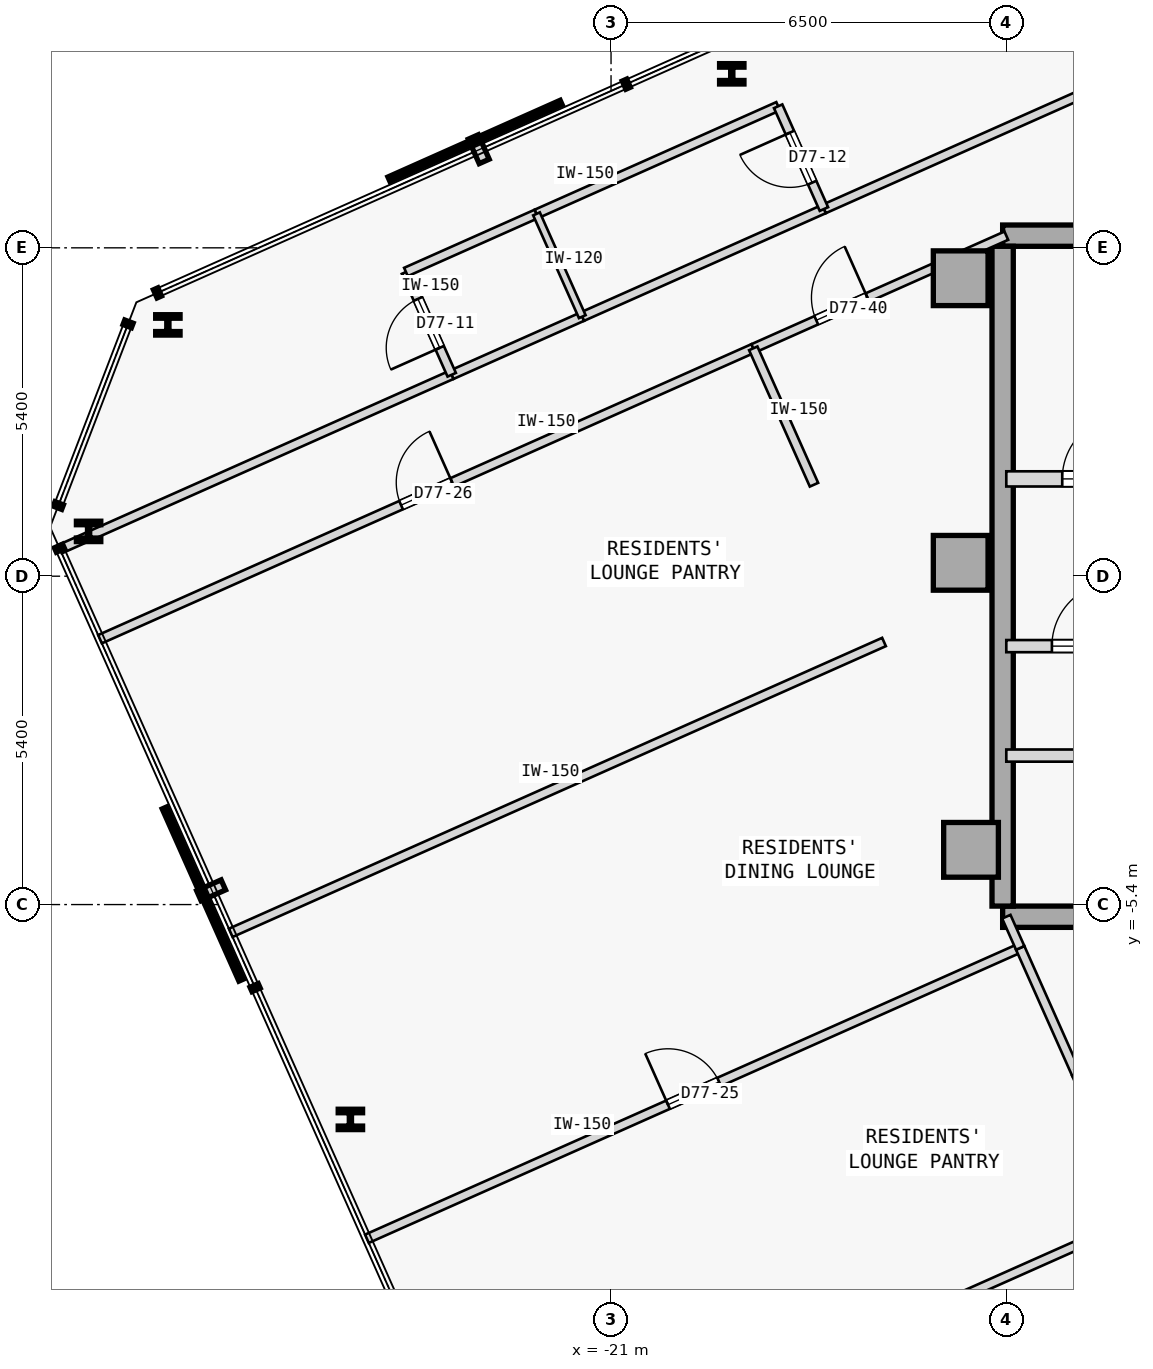
"""IFC4 building model, lengths in metres.
Left out: names, types, materials, properties, quantities, classifications, styles, units other than length and angle.
Written with IfcOpenShell. Run it as: python <this file> out.ifc"""

import sys

from ifc_helpers import new_model, si_unit, direction, frame, frame_2d, origin, origin_2d, place, context, subcontext, project, spatial, rectangle, i_section, extrude, element, fill, save


model = new_model("IFC4")
c1 = context("Model", 3, precision=1e-05, world=origin(), true_north=direction((0.0, 1.0)))
c2 = subcontext(c1, "Body", "Model", "MODEL_VIEW")
j1 = project(units=[si_unit("LENGTHUNIT", "METRE"), si_unit("PLANEANGLEUNIT", "RADIAN")], contexts=[c1])
p1 = place(None, origin())
s1 = spatial("IfcSite", under=j1, at=p1, CompositionType="ELEMENT")
p2 = place(p1, origin())
s2 = spatial("IfcBuilding", under=s1, at=p2, CompositionType="ELEMENT")
p3 = place(p2, frame((0.0, 0.0, 288.6)))
s3 = spatial("IfcBuildingStorey", under=s2, at=p3, CompositionType="ELEMENT", Elevation=288.6)
for number, where, z_axis, x_axis in (
    (1, (-15.25, 4.9, 0.0), (0.0, 0.0, 1.0), (1.0, 0.0, 0.0)),
    (2, (-15.25, 0.22, 0.0), (0.0, 0.0, 1.0), (1.0, 0.0, 0.0)),
    (3, (-15.08, -4.5, 0.0), (0.0, 0.0, 1.0), (1.0, 0.0, 0.0)),
):
    element("IfcColumn", number, at=place(p3, frame(where, z_axis=z_axis, x_axis=x_axis)), inside=s3, PredefinedType="COLUMN", context=c2, shape_type="SweptSolid", body=[
        extrude(rectangle(XDim=0.9, YDim=0.9, at=origin_2d()), origin(), (0.0, 0.0, 1.0), 3.35),
    ])
p4 = place(p3, frame((-14.56, 5.6, 0.0), z_axis=(0.0, 0.0, 1.0), x_axis=(1.0, 0.0, 0.0)))
e4 = element("IfcWall", 4, at=p4, inside=s3, PredefinedType="SHEAR", context=c2, shape_type="SweptSolid", body=[
    extrude(rectangle(XDim=11.41, YDim=0.35, at=frame_2d((5.705, 0.0))), origin(), (0.0, 0.0, 1.0), 3.125),
])
p5 = place(p3, frame((-14.56, -5.6, 0.0), z_axis=(0.0, 0.0, 1.0), x_axis=(1.0, 0.0, 0.0)))
e5 = element("IfcWall", 5, at=p5, inside=s3, PredefinedType="SHEAR", context=c2, shape_type="SweptSolid", body=[
    extrude(rectangle(XDim=10.86, YDim=0.35, at=frame_2d((5.43, 0.0))), origin(), (0.0, 0.0, 1.0), 3.125),
])
p6 = place(p3, frame((-14.56, -5.425, 0.0), z_axis=(0.0, 0.0, 1.0), x_axis=(0.0, 1.0, 0.0)))
e6 = element("IfcWall", 6, at=p6, inside=s3, PredefinedType="SHEAR", context=c2, shape_type="SweptSolid", body=[
    extrude(rectangle(XDim=10.85, YDim=0.35, at=frame_2d((5.425, 0.0))), origin(), (0.0, 0.0, 1.0), 3.125),
])
for number, where, z_axis, x_axis in (
    (7, (-19.015, 8.262, 0.0), (0.0, 0.0, 1.0), (1.0, 0.0, 0.0)),
    (8, (-28.288, 4.133, 0.0), (0.0, 0.0, 1.0), (1.0, 0.0, 0.0)),
    (9, (-29.592, 0.737, 0.0), (0.0, 0.0, 1.0), (1.0, 0.0, 0.0)),
    (10, (-25.286, -8.933, 0.0), (0.0, 0.0, 1.0), (1.0, 0.0, 0.0)),
):
    element("IfcColumn", number, at=place(p3, frame(where, z_axis=z_axis, x_axis=x_axis)), inside=s3, PredefinedType="COLUMN", context=c2, shape_type="SweptSolid", body=[
        extrude(i_section(OverallWidth=0.401, OverallDepth=0.335, WebThickness=0.036, FlangeThickness=0.058, FilletRadius=0.015, at=origin_2d()), origin(), (0.0, 0.0, 1.0), 3.35),
    ])
p7 = place(p3, frame((-14.5, 1.6, 0.0), z_axis=(0.0, 0.0, 1.0), x_axis=(1.0, 0.0, 0.0)))
e11 = element("IfcWall", 11, at=p7, inside=s3, PredefinedType="STANDARD", context=c2, shape_type="SweptSolid", body=[
    extrude(rectangle(XDim=3.6, YDim=0.25, at=frame_2d((1.8, 0.0))), origin(), (0.0, 0.0, 1.0), 3.125),
])
p8 = place(p7, frame((0.92, 0.0, 0.0)))
e12 = element("IfcOpeningElement", 12, at=p8, cuts=e11, PredefinedType="OPENING", context=c2, shape_type="SweptSolid", body=[
    extrude(rectangle(XDim=1.05, YDim=2.15, at=frame_2d((0.525, 1.075))), frame((0.0, 0.135, 0.0), z_axis=(0.0, -1.0, 0.0), x_axis=(1.0, 0.0, 0.0)), (0.0, 0.0, 1.0), 0.27),
])
p9 = place(p3, frame((-14.5, -1.15, 0.0), z_axis=(0.0, 0.0, 1.0), x_axis=(1.0, 0.0, 0.0)))
e13 = element("IfcWall", 13, at=p9, inside=s3, PredefinedType="STANDARD", context=c2, shape_type="SweptSolid", body=[
    extrude(rectangle(XDim=2.95, YDim=0.2, at=frame_2d((1.475, 0.0))), origin(), (0.0, 0.0, 1.0), 3.125),
])
p10 = place(p9, frame((0.75, 0.0, 0.0)))
e14 = element("IfcOpeningElement", 14, at=p10, cuts=e13, PredefinedType="OPENING", context=c2, shape_type="SweptSolid", body=[
    extrude(rectangle(XDim=1.05, YDim=2.18, at=frame_2d((0.525, 1.09))), frame((0.0, 0.11, 0.0), z_axis=(0.0, -1.0, 0.0), x_axis=(1.0, 0.0, 0.0)), (0.0, 0.0, 1.0), 0.22),
])
p11 = place(p3, frame((-14.5, -2.95, 0.0), z_axis=(0.0, 0.0, 1.0), x_axis=(1.0, 0.0, 0.0)))
e15 = element("IfcWall", 15, at=p11, inside=s3, PredefinedType="STANDARD", context=c2, shape_type="SweptSolid", body=[
    extrude(rectangle(XDim=10.8, YDim=0.2, at=frame_2d((5.4, 0.0))), origin(), (0.0, 0.0, 1.0), 3.125),
])
p12 = place(p11, frame((9.17, 0.0, 0.0)))
e16 = element("IfcOpeningElement", 16, at=p12, cuts=e15, PredefinedType="OPENING", context=c2, shape_type="SweptSolid", body=[
    extrude(rectangle(XDim=1.1, YDim=2.15, at=frame_2d((0.55, 1.075))), frame((0.0, 0.11, 0.0), z_axis=(0.0, -1.0, 0.0), x_axis=(1.0, 0.0, 0.0)), (0.0, 0.0, 1.0), 0.22),
])
p13 = place(p11, frame((3.86, 0.0, 0.0)))
e17 = element("IfcOpeningElement", 17, at=p13, cuts=e15, PredefinedType="OPENING", context=c2, shape_type="SweptSolid", body=[
    extrude(rectangle(XDim=0.92, YDim=2.15, at=frame_2d((0.46, 1.075))), frame((0.0, 0.11, 0.0), z_axis=(0.0, -1.0, 0.0), x_axis=(1.0, 0.0, 0.0)), (0.0, 0.0, 1.0), 0.22),
])
p14 = place(p3, frame((-30.063, 0.444, 0.0), z_axis=(0.0, 0.0, 1.0), x_axis=(0.91354584652, 0.406735769642, 0.0)))
e18 = element("IfcWall", 18, at=p14, inside=s3, PredefinedType="PARTITIONING", context=c2, shape_type="SweptSolid", body=[
    extrude(rectangle(XDim=7.053, YDim=0.15, at=frame_2d((3.526, 0.0))), origin(), (0.0, 0.0, 1.0), 3.125),
])
p15 = place(p3, frame((-17.499, 6.038, 0.0), z_axis=(0.0, 0.0, 1.0), x_axis=(0.913541623157, 0.406745255362, 0.0)))
e19 = element("IfcWall", 19, at=p15, inside=s3, PredefinedType="PARTITIONING", context=c2, shape_type="SweptSolid", body=[
    extrude(rectangle(XDim=17.879, YDim=0.15, at=frame_2d((8.939, 0.0))), origin(), (0.0, 0.0, 1.0), 3.125),
])
p16 = place(p15, frame((8.465, 0.0, 0.0)))
e20 = element("IfcOpeningElement", 20, at=p16, cuts=e19, PredefinedType="OPENING", context=c2, shape_type="SweptSolid", body=[
    extrude(rectangle(XDim=0.95, YDim=2.15, at=frame_2d((0.475, 1.075))), frame((0.0, 0.085, 0.0), z_axis=(0.0, -1.0, 0.0), x_axis=(1.0, 0.0, 0.0)), (0.0, 0.0, 1.0), 0.17),
])
p17 = place(p3, frame((-23.62, 3.312, 0.0), z_axis=(0.0, 0.0, 1.0), x_axis=(0.913558622212, 0.406707073682, 0.0)))
e21 = element("IfcWall", 21, at=p17, inside=s3, PredefinedType="PARTITIONING", context=c2, shape_type="SweptSolid", body=[
    extrude(rectangle(XDim=2.35, YDim=0.15, at=frame_2d((1.175, 0.0))), origin(), (0.0, 0.0, 1.0), 3.125),
])
p18 = place(p3, frame((-21.473, 4.268, 0.0), z_axis=(0.0, 0.0, 1.0), x_axis=(0.913545193015, 0.406737237438, 0.0)))
e22 = element("IfcWall", 22, at=p18, inside=s3, PredefinedType="PARTITIONING", context=c2, shape_type="SweptSolid", body=[
    extrude(rectangle(XDim=4.35, YDim=0.15, at=frame_2d((2.175, 0.0))), origin(), (0.0, 0.0, 1.0), 3.125),
])
p19 = place(p3, frame((-29.404, -1.036, 0.0), z_axis=(0.0, 0.0, 1.0), x_axis=(0.913544247064, 0.406739362069, 0.0)))
e23 = element("IfcWall", 23, at=p19, inside=s3, PredefinedType="PARTITIONING", context=c2, shape_type="SweptSolid", body=[
    extrude(rectangle(XDim=11.76, YDim=0.15, at=frame_2d((5.88, 0.0))), origin(), (0.0, 0.0, 1.0), 3.125),
])
p20 = place(p19, frame((5.42, 0.0, 0.0)))
e24 = element("IfcOpeningElement", 24, at=p20, cuts=e23, PredefinedType="OPENING", context=c2, shape_type="SweptSolid", body=[
    extrude(rectangle(XDim=0.92, YDim=2.15, at=frame_2d((0.46, 1.075))), frame((0.0, 0.085, 0.0), z_axis=(0.0, -1.0, 0.0), x_axis=(1.0, 0.0, 0.0)), (0.0, 0.0, 1.0), 0.17),
])
p21 = place(p3, frame((-18.661, 3.747, 0.0), z_axis=(0.0, 0.0, 1.0), x_axis=(0.913535055583, 0.40676000568, 0.0)))
e25 = element("IfcWall", 25, at=p21, inside=s3, PredefinedType="PARTITIONING", context=c2, shape_type="SweptSolid", body=[
    extrude(rectangle(XDim=4.555, YDim=0.15, at=frame_2d((2.277, 0.0))), origin(), (0.0, 0.0, 1.0), 3.125),
])
p22 = place(p21, frame((1.134, 0.0, 0.0)))
e26 = element("IfcOpeningElement", 26, at=p22, cuts=e25, PredefinedType="OPENING", context=c2, shape_type="SweptSolid", body=[
    extrude(rectangle(XDim=0.92, YDim=2.15, at=frame_2d((0.46, 1.075))), frame((0.0, 0.085, 0.0), z_axis=(0.0, -1.0, 0.0), x_axis=(1.0, 0.0, 0.0)), (0.0, 0.0, 1.0), 0.17),
])
p23 = place(p3, frame((-23.62, 3.312, 0.0), z_axis=(0.0, 0.0, 1.0), x_axis=(-0.406701600856, 0.913561058639, 0.0)))
e27 = element("IfcWall", 27, at=p23, inside=s3, PredefinedType="PARTITIONING", context=c2, shape_type="SweptSolid", body=[
    extrude(rectangle(XDim=1.85, YDim=0.15, at=frame_2d((0.925, 0.0))), origin(), (0.0, 0.0, 1.0), 3.125),
])
p24 = place(p23, frame((0.485, 0.0, 0.0)))
e28 = element("IfcOpeningElement", 28, at=p24, cuts=e27, PredefinedType="OPENING", context=c2, shape_type="SweptSolid", body=[
    extrude(rectangle(XDim=0.88, YDim=2.15, at=frame_2d((0.44, 1.075))), frame((0.0, 0.085, 0.0), z_axis=(0.0, -1.0, 0.0), x_axis=(1.0, 0.0, 0.0)), (0.0, 0.0, 1.0), 0.17),
])
p25 = place(p3, frame((-24.373, 5.003, 0.0), z_axis=(0.0, 0.0, 1.0), x_axis=(0.913558622212, 0.406707073682, 0.0)))
e29 = element("IfcWall", 29, at=p25, inside=s3, PredefinedType="PARTITIONING", context=c2, shape_type="SweptSolid", body=[
    extrude(rectangle(XDim=2.35, YDim=0.15, at=frame_2d((1.175, 0.0))), origin(), (0.0, 0.0, 1.0), 3.125),
])
p26 = place(p3, frame((-22.226, 5.958, 0.0), z_axis=(0.0, 0.0, 1.0), x_axis=(0.913545193015, 0.406737237438, 0.0)))
e30 = element("IfcWall", 30, at=p26, inside=s3, PredefinedType="PARTITIONING", context=c2, shape_type="SweptSolid", body=[
    extrude(rectangle(XDim=4.35, YDim=0.15, at=frame_2d((2.175, 0.0))), origin(), (0.0, 0.0, 1.0), 3.125),
])
p27 = place(p3, frame((-17.499, 6.038, 0.0), z_axis=(0.0, 0.0, 1.0), x_axis=(-0.406701600856, 0.913561058639, 0.0)))
e31 = element("IfcWall", 31, at=p27, inside=s3, PredefinedType="PARTITIONING", context=c2, shape_type="SweptSolid", body=[
    extrude(rectangle(XDim=1.85, YDim=0.15, at=frame_2d((0.925, 0.0))), origin(), (0.0, 0.0, 1.0), 3.125),
])
p28 = place(p27, frame((0.475, 0.0, 0.0)))
e32 = element("IfcOpeningElement", 32, at=p28, cuts=e31, PredefinedType="OPENING", context=c2, shape_type="SweptSolid", body=[
    extrude(rectangle(XDim=0.9, YDim=2.15, at=frame_2d((0.45, 1.075))), frame((0.0, 0.085, 0.0), z_axis=(0.0, -1.0, 0.0), x_axis=(1.0, 0.0, 0.0)), (0.0, 0.0, 1.0), 0.17),
])
p29 = place(p3, frame((-21.473, 4.268, 0.0), z_axis=(0.0, 0.0, 1.0), x_axis=(-0.406701600856, 0.913561058639, 0.0)))
e33 = element("IfcWall", 33, at=p29, inside=s3, PredefinedType="PARTITIONING", context=c2, shape_type="SweptSolid", body=[
    extrude(rectangle(XDim=1.85, YDim=0.12, at=frame_2d((0.925, 0.0))), origin(), (0.0, 0.0, 1.0), 3.125),
])
p30 = place(p3, frame((-23.043, -15.323, 0.0), z_axis=(0.0, 0.0, 1.0), x_axis=(0.913547681516, 0.406731648137, 0.0)))
e34 = element("IfcWall", 34, at=p30, inside=s3, PredefinedType="PARTITIONING", context=c2, shape_type="SweptSolid", body=[
    extrude(rectangle(XDim=11.76, YDim=0.15, at=frame_2d((5.88, 0.0))), origin(), (0.0, 0.0, 1.0), 3.125),
])
p31 = place(p30, frame((5.42, 0.0, 0.0)))
e35 = element("IfcOpeningElement", 35, at=p31, cuts=e34, PredefinedType="OPENING", context=c2, shape_type="SweptSolid", body=[
    extrude(rectangle(XDim=0.92, YDim=2.15, at=frame_2d((0.46, 1.075))), frame((0.0, 0.085, 0.0), z_axis=(0.0, -1.0, 0.0), x_axis=(1.0, 0.0, 0.0)), (0.0, 0.0, 1.0), 0.17),
])
p32 = place(p3, frame((-25.014, -10.896, 0.0), z_axis=(0.0, 0.0, 1.0), x_axis=(0.913544247064, 0.406739362069, 0.0)))
e36 = element("IfcWall", 36, at=p32, inside=s3, PredefinedType="PARTITIONING", context=c2, shape_type="SweptSolid", body=[
    extrude(rectangle(XDim=11.76, YDim=0.15, at=frame_2d((5.88, 0.0))), origin(), (0.0, 0.0, 1.0), 3.125),
])
p33 = place(p32, frame((5.42, 0.0, 0.0)))
e37 = element("IfcOpeningElement", 37, at=p33, cuts=e36, PredefinedType="OPENING", context=c2, shape_type="SweptSolid", body=[
    extrude(rectangle(XDim=0.92, YDim=2.15, at=frame_2d((0.46, 1.075))), frame((0.0, 0.085, 0.0), z_axis=(0.0, -1.0, 0.0), x_axis=(1.0, 0.0, 0.0)), (0.0, 0.0, 1.0), 0.17),
])
p34 = place(p3, frame((-12.3, -10.54, 0.0), z_axis=(0.0, 0.0, 1.0), x_axis=(-0.406788806475, 0.913522231216, 0.0)))
e38 = element("IfcWall", 38, at=p34, inside=s3, PredefinedType="PARTITIONING", context=c2, shape_type="SweptSolid", body=[
    extrude(rectangle(XDim=2.577, YDim=0.15, at=frame_2d((1.289, 0.0))), origin(), (0.0, 0.0, 1.0), 3.125),
])
p35 = place(p3, frame((-13.348, -8.186, 0.0), z_axis=(0.0, 0.0, 1.0), x_axis=(-0.40673740295, 0.913545119324, 0.0)))
e39 = element("IfcWall", 39, at=p35, inside=s3, PredefinedType="PARTITIONING", context=c2, shape_type="SweptSolid", body=[
    extrude(rectangle(XDim=2.269, YDim=0.15, at=frame_2d((1.134, 0.0))), origin(), (0.0, 0.0, 1.0), 3.125),
])
p36 = place(p3, frame((-27.254, -5.865, 0.0), z_axis=(0.0, 0.0, 1.0), x_axis=(0.913547681516, 0.406731648137, 0.0)))
e40 = element("IfcWall", 40, at=p36, inside=s3, PredefinedType="PARTITIONING", context=c2, shape_type="SweptSolid", body=[
    extrude(rectangle(XDim=11.76, YDim=0.15, at=frame_2d((5.88, 0.0))), origin(), (0.0, 0.0, 1.0), 3.125),
])
p37 = place(p3, frame((-14.271, -6.113, 0.0), z_axis=(0.0, 0.0, 1.0), x_axis=(-0.406622099206, 0.913596447255, 0.0)))
e41 = element("IfcWall", 41, at=p37, inside=s3, PredefinedType="PARTITIONING", context=c2, shape_type="SweptSolid", body=[
    extrude(rectangle(XDim=0.562, YDim=0.15, at=frame_2d((0.281, 0.0))), origin(), (0.0, 0.0, 1.0), 3.125),
])
p38 = place(p3, frame((-17.663, 1.504, 0.0), z_axis=(0.0, 0.0, 1.0), x_axis=(-0.406747374275, 0.913540679729, 0.0)))
e42 = element("IfcWall", 42, at=p38, inside=s3, PredefinedType="PARTITIONING", context=c2, shape_type="SweptSolid", body=[
    extrude(rectangle(XDim=2.455, YDim=0.15, at=frame_2d((1.228, 0.0))), origin(), (0.0, 0.0, 1.0), 3.125),
])
p39 = place(p8, origin())
e43 = element("IfcDoor", 43, at=p39, inside=s3, OperationType="SINGLE_SWING_RIGHT", PredefinedType="DOOR", context=c2, shape_type="SweptSolid", body=[
    extrude(rectangle(XDim=1.05, YDim=2.15, at=frame_2d((0.525, 1.075))), frame((0.0, 0.025, 0.0), z_axis=(0.0, -1.0, 0.0), x_axis=(1.0, 0.0, 0.0)), (0.0, 0.0, 1.0), 0.05),
])
fill(e12, e43)
p40 = place(p10, origin())
e44 = element("IfcDoor", 44, at=p40, inside=s3, OperationType="SINGLE_SWING_RIGHT", PredefinedType="DOOR", context=c2, shape_type="SweptSolid", body=[
    extrude(rectangle(XDim=1.05, YDim=2.18, at=frame_2d((0.525, 1.09))), frame((0.0, 0.025, 0.0), z_axis=(0.0, -1.0, 0.0), x_axis=(1.0, 0.0, 0.0)), (0.0, 0.0, 1.0), 0.05),
])
fill(e14, e44)
p41 = place(p24, origin())
e45 = element("IfcDoor", 45, at=p41, inside=s3, OperationType="SINGLE_SWING_LEFT", PredefinedType="DOOR", context=c2, shape_type="SweptSolid", body=[
    extrude(rectangle(XDim=0.88, YDim=2.15, at=frame_2d((0.44, 1.075))), frame((0.0, 0.025, 0.0), z_axis=(0.0, -1.0, 0.0), x_axis=(1.0, 0.0, 0.0)), (0.0, 0.0, 1.0), 0.05),
])
fill(e28, e45)
p42 = place(p28, origin())
e46 = element("IfcDoor", 46, at=p42, inside=s3, OperationType="SINGLE_SWING_RIGHT", PredefinedType="DOOR", context=c2, shape_type="SweptSolid", body=[
    extrude(rectangle(XDim=0.9, YDim=2.15, at=frame_2d((0.45, 1.075))), frame((0.0, 0.025, 0.0), z_axis=(0.0, -1.0, 0.0), x_axis=(1.0, 0.0, 0.0)), (0.0, 0.0, 1.0), 0.05),
])
fill(e32, e46)
p43 = place(p33, origin())
e47 = element("IfcDoor", 47, at=p43, inside=s3, OperationType="SINGLE_SWING_LEFT", PredefinedType="DOOR", context=c2, shape_type="SweptSolid", body=[
    extrude(rectangle(XDim=0.92, YDim=2.15, at=frame_2d((0.46, 1.075))), frame((0.0, 0.025, 0.0), z_axis=(0.0, -1.0, 0.0), x_axis=(1.0, 0.0, 0.0)), (0.0, 0.0, 1.0), 0.05),
])
fill(e37, e47)
p44 = place(p20, origin())
e48 = element("IfcDoor", 48, at=p44, inside=s3, OperationType="SINGLE_SWING_RIGHT", PredefinedType="DOOR", context=c2, shape_type="SweptSolid", body=[
    extrude(rectangle(XDim=0.92, YDim=2.15, at=frame_2d((0.46, 1.075))), frame((0.0, 0.025, 0.0), z_axis=(0.0, -1.0, 0.0), x_axis=(1.0, 0.0, 0.0)), (0.0, 0.0, 1.0), 0.05),
])
fill(e24, e48)
p45 = place(p22, origin())
e49 = element("IfcDoor", 49, at=p45, inside=s3, OperationType="SINGLE_SWING_RIGHT", PredefinedType="DOOR", context=c2, shape_type="SweptSolid", body=[
    extrude(rectangle(XDim=0.92, YDim=2.15, at=frame_2d((0.46, 1.075))), frame((0.0, 0.025, 0.0), z_axis=(0.0, -1.0, 0.0), x_axis=(1.0, 0.0, 0.0)), (0.0, 0.0, 1.0), 0.05),
])
fill(e26, e49)
save(model, sys.argv[1])
